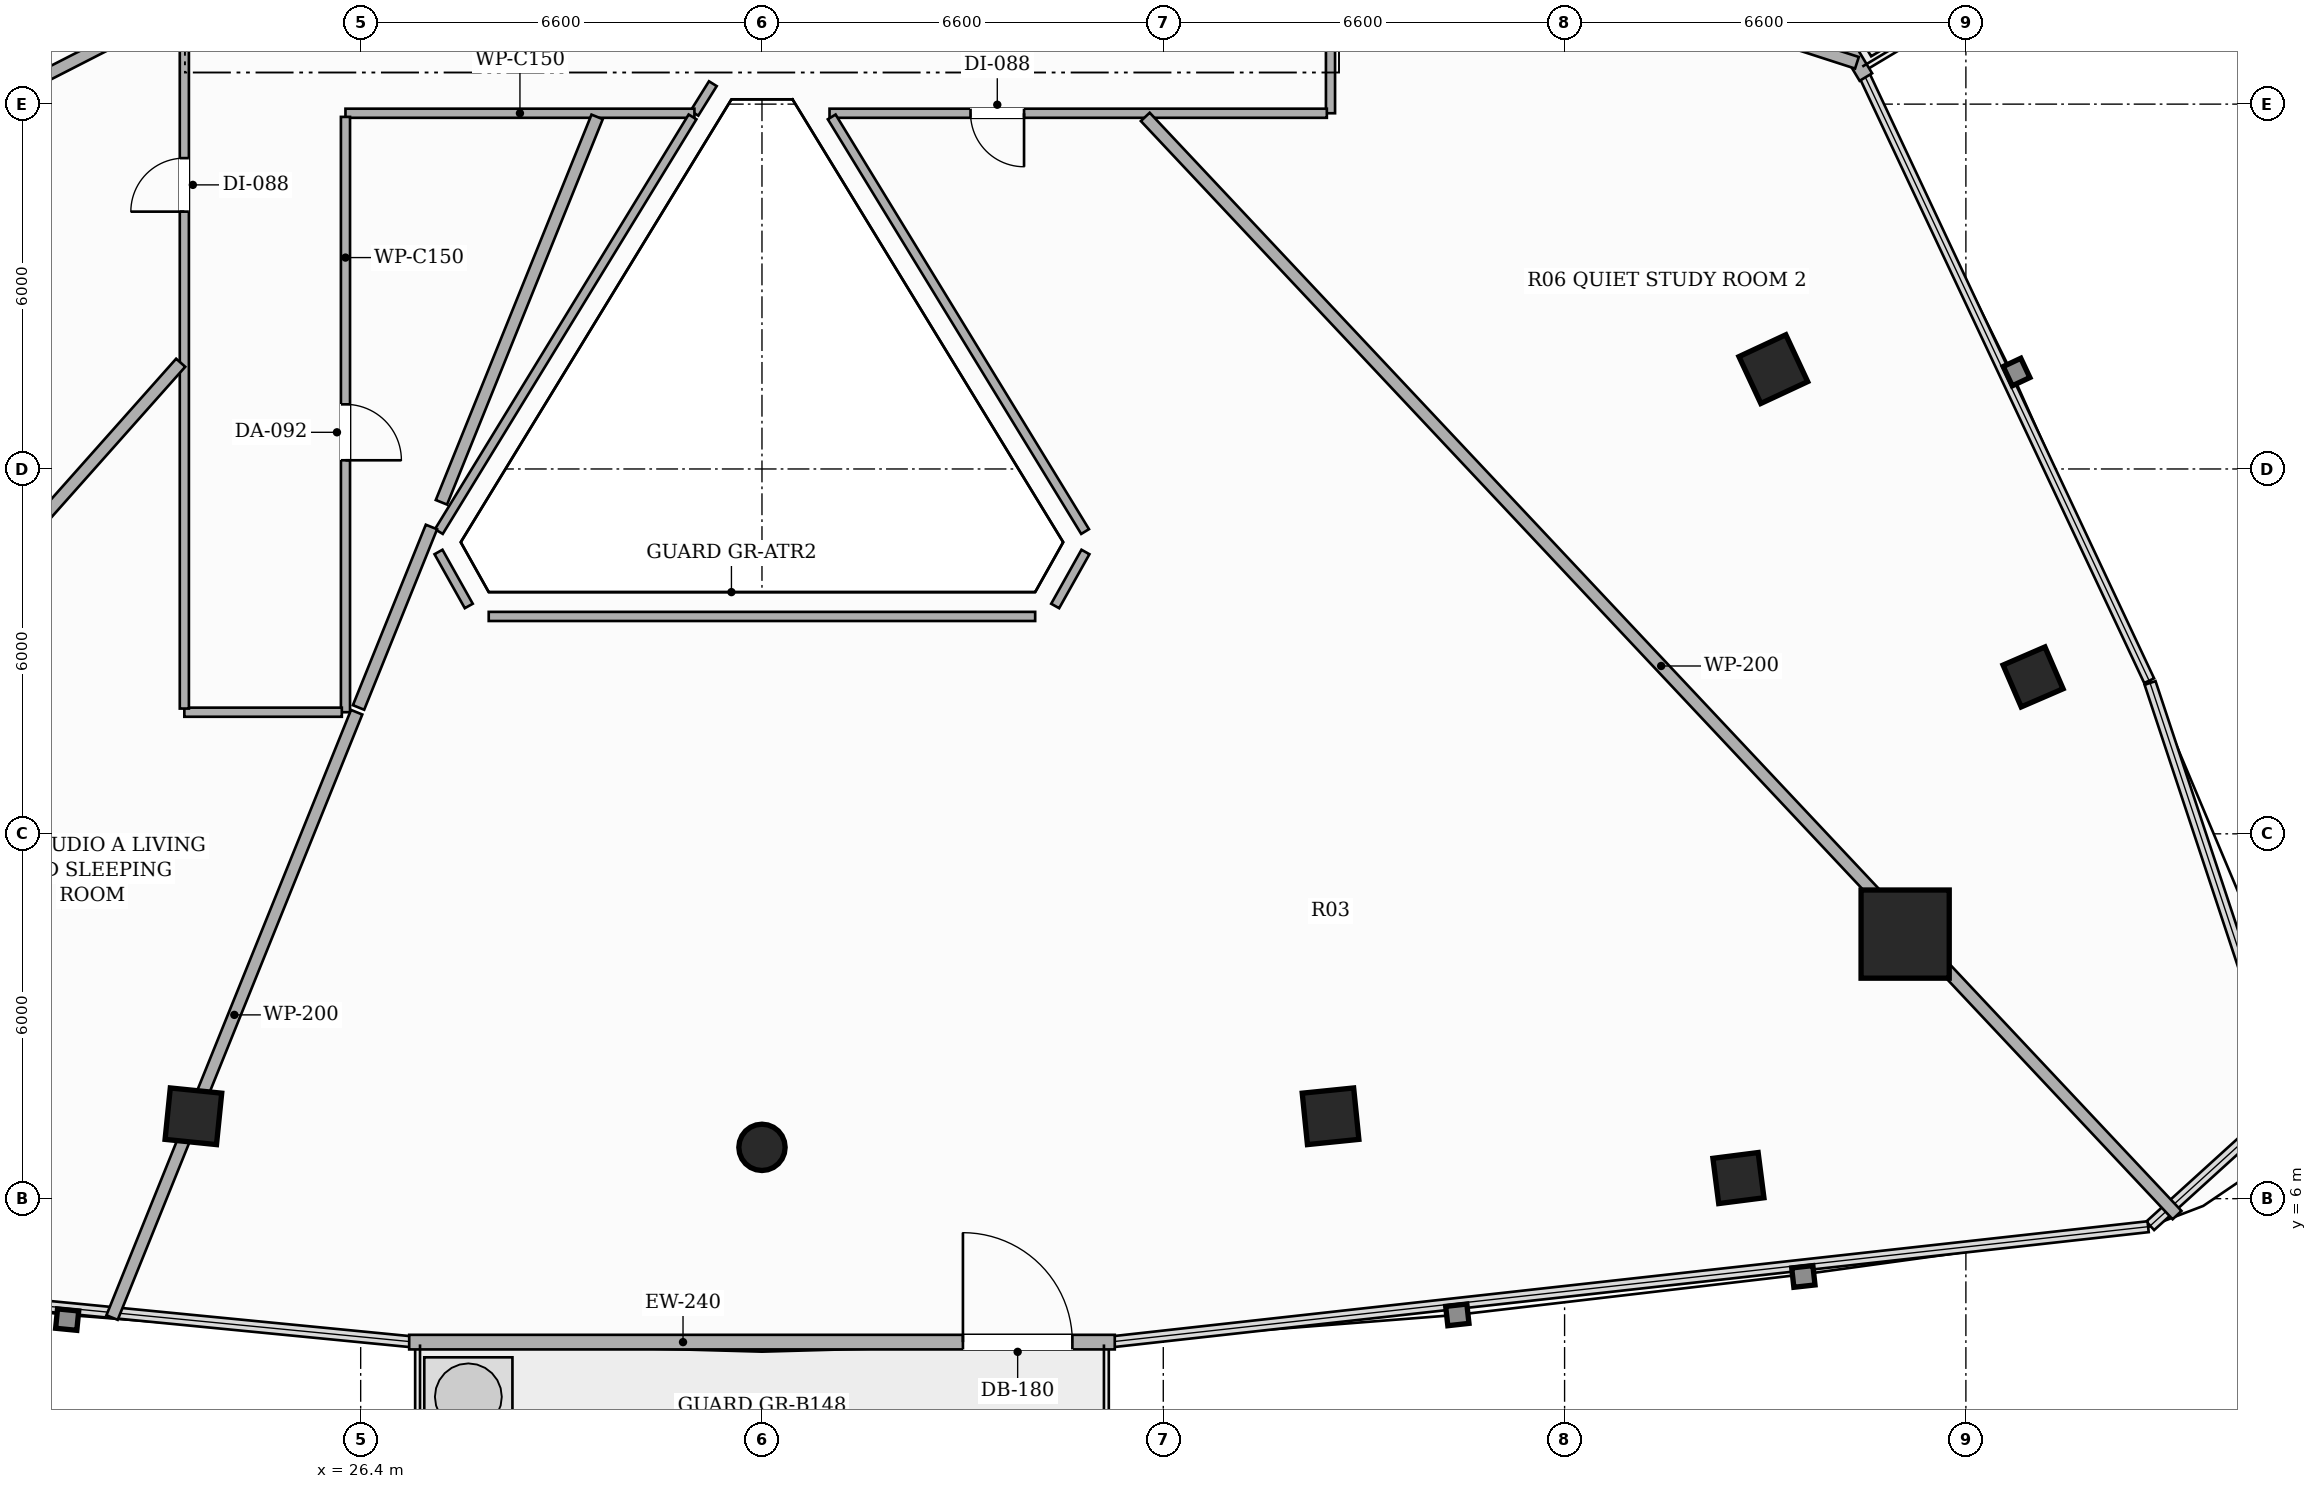
"""IFC4 building model, lengths in metres.
Left out: names, types, materials, properties, quantities, classifications, styles, units other than length and angle.
Written with IfcOpenShell. Run it as: python <this file> out.ifc"""

import sys

from ifc_helpers import new_model, si_unit, direction, frame, frame_2d, origin, origin_2d, place, context, subcontext, project, spatial, rectangle, hollow_rectangle, hollow_circle, extrude, element, fill, save


model = new_model("IFC4")
c1 = context("Model", 3, precision=1e-05, world=origin(), true_north=direction((0.0, 1.0)))
c2 = subcontext(c1, "Body", "Model", "MODEL_VIEW")
j1 = project(units=[si_unit("LENGTHUNIT", "METRE"), si_unit("PLANEANGLEUNIT", "RADIAN")], contexts=[c1])
p1 = place(None, origin())
s1 = spatial("IfcSite", under=j1, at=p1, CompositionType="ELEMENT")
p2 = place(p1, origin())
s2 = spatial("IfcBuilding", under=s1, at=p2, CompositionType="ELEMENT")
p3 = place(p2, frame((0.0, 0.0, 150.65)))
s3 = spatial("IfcBuildingStorey", under=s2, at=p3, CompositionType="ELEMENT", Elevation=150.65)
p4 = place(p3, frame((51.801, 10.351, 0.0), z_axis=(0.0, 0.0, 1.0), x_axis=(1.0, 0.0, 0.0)))
e1 = element("IfcColumn", 1, at=p4, inside=s3, PredefinedType="COLUMN", context=c2, shape_type="SweptSolid", body=[
    extrude(hollow_rectangle(XDim=1.45, YDim=1.45, WallThickness=0.045, at=origin_2d()), origin(), (0.0, 0.0, 1.0), 3.3),
])
p5 = place(p3, frame((23.649, 7.355, 0.0), z_axis=(0.0, 0.0, 1.0), x_axis=(-0.994880708829, 0.101056297183, 0.0)))
e2 = element("IfcColumn", 2, at=p5, inside=s3, PredefinedType="COLUMN", context=c2, shape_type="SweptSolid", body=[
    extrude(hollow_rectangle(XDim=0.85, YDim=0.85, WallThickness=0.028, at=origin_2d()), origin(), (0.0, 0.0, 1.0), 3.3),
])
p6 = place(p3, frame((33.0, 6.844, 0.0), z_axis=(0.0, 0.0, 1.0), x_axis=(1.0, 0.0, 0.0)))
e3 = element("IfcColumn", 3, at=p6, inside=s3, PredefinedType="COLUMN", context=c2, shape_type="SweptSolid", body=[
    extrude(hollow_circle(Radius=0.381, WallThickness=0.022, at=origin_2d()), origin(), (0.0, 0.0, 1.0), 3.3),
])
for number, where, z_axis, x_axis in (
    (4, (42.351, 7.355, 0.0), (0.0, 0.0, 1.0), (0.995, 0.101, 0.0)),
    (5, (49.633, 19.642, 0.0), (0.0, 0.0, 1.0), (-0.423, 0.906, 0.0)),
):
    element("IfcColumn", number, at=place(p3, frame(where, z_axis=z_axis, x_axis=x_axis)), inside=s3, PredefinedType="COLUMN", context=c2, shape_type="SweptSolid", body=[
        extrude(hollow_rectangle(XDim=0.85, YDim=0.85, WallThickness=0.028, at=origin_2d()), origin(), (0.0, 0.0, 1.0), 3.3),
    ])
for number, where, z_axis, x_axis in (
    (6, (49.059, 6.339, 0.0), (0.0, 0.0, 1.0), (0.992, 0.127, 0.0)),
    (7, (53.905, 14.58, 0.0), (0.0, 0.0, 1.0), (-0.397, 0.918, 0.0)),
):
    element("IfcColumn", number, at=place(p3, frame(where, z_axis=z_axis, x_axis=x_axis)), inside=s3, PredefinedType="COLUMN", context=c2, shape_type="SweptSolid", body=[
        extrude(hollow_rectangle(XDim=0.75, YDim=0.75, WallThickness=0.025, at=origin_2d()), origin(), (0.0, 0.0, 1.0), 3.3),
    ])
p7 = place(p3, frame((27.198, 3.641, 0.0), z_axis=(0.0, 0.0, 1.0), x_axis=(1.0, 0.0, 0.0)))
e8 = element("IfcWall", 8, at=p7, inside=s3, PredefinedType="SOLIDWALL", context=c2, shape_type="SweptSolid", body=[
    extrude(rectangle(XDim=11.604, YDim=0.24, at=frame_2d((5.802, 0.0))), origin(), (0.0, 0.0, 1.0), 2.624),
])
p8 = place(p7, frame((9.107, 0.0, 0.0)))
e9 = element("IfcOpeningElement", 9, at=p8, cuts=e8, PredefinedType="OPENING", context=c2, shape_type="SweptSolid", body=[
    extrude(rectangle(XDim=1.8, YDim=2.2, at=frame_2d((0.9, 1.1))), frame((0.0, 0.13, 0.0), z_axis=(0.0, -1.0, 0.0), x_axis=(1.0, 0.0, 0.0)), (0.0, 0.0, 1.0), 0.26),
])
p9 = place(p3, frame((51.155, 24.445, 0.0), z_axis=(0.0, 0.0, 1.0), x_axis=(-0.514335781973, 0.857588889493, 0.0)))
e10 = element("IfcWall", 10, at=p9, inside=s3, PredefinedType="SOLIDWALL", context=c2, shape_type="SweptSolid", body=[
    extrude(rectangle(XDim=11.222, YDim=0.24, at=frame_2d((5.611, 0.0))), origin(), (0.0, 0.0, 1.0), 2.624),
])
p10 = place(p9, frame((8.725, 0.0, 0.0)))
e11 = element("IfcOpeningElement", 11, at=p10, cuts=e10, PredefinedType="OPENING", context=c2, shape_type="SweptSolid", body=[
    extrude(rectangle(XDim=1.8, YDim=2.2, at=frame_2d((0.9, 1.1))), frame((0.0, 0.13, 0.0), z_axis=(0.0, -1.0, 0.0), x_axis=(1.0, 0.0, 0.0)), (0.0, 0.0, 1.0), 0.26),
])
p11 = place(p3, frame((32.192, 24.336, 0.0), z_axis=(0.0, 0.0, 1.0), x_axis=(-0.529155471054, -0.848524889119, 0.0)))
e12 = element("IfcWall", 12, at=p11, inside=s3, PredefinedType="PARTITIONING", context=c2, shape_type="SweptSolid", body=[
    extrude(rectangle(XDim=0.573, YDim=0.15, at=frame_2d((0.286, 0.0))), origin(), (0.0, 0.0, 1.0), 3.06),
])
p12 = place(p3, frame((31.889, 23.85, 0.0), z_axis=(0.0, 0.0, 1.0), x_axis=(-1.0, 0.0, 0.0)))
e13 = element("IfcWall", 13, at=p12, inside=s3, PredefinedType="PARTITIONING", context=c2, shape_type="SweptSolid", body=[
    extrude(rectangle(XDim=5.739, YDim=0.15, at=frame_2d((2.87, 0.0))), origin(), (0.0, 0.0, 1.0), 2.721),
])
p13 = place(p3, frame((26.15, 23.79, 0.0), z_axis=(0.0, 0.0, 1.0), x_axis=(0.0, -1.0, 0.0)))
e14 = element("IfcWall", 14, at=p13, inside=s3, PredefinedType="PARTITIONING", context=c2, shape_type="SweptSolid", body=[
    extrude(rectangle(XDim=9.79, YDim=0.15, at=frame_2d((4.895, 0.0))), origin(), (0.0, 0.0, 1.0), 2.721),
])
p14 = place(p13, frame((4.727, 0.0, 0.0)))
e15 = element("IfcOpeningElement", 15, at=p14, cuts=e14, PredefinedType="OPENING", context=c2, shape_type="SweptSolid", body=[
    extrude(rectangle(XDim=0.92, YDim=2.15, at=frame_2d((0.46, 1.075))), frame((0.0, 0.085, 0.0), z_axis=(0.0, -1.0, 0.0), x_axis=(1.0, 0.0, 0.0)), (0.0, 0.0, 1.0), 0.17),
])
p15 = place(p3, frame((26.09, 14.0, 0.0), z_axis=(0.0, 0.0, 1.0), x_axis=(-1.0, 0.0, 0.0)))
e16 = element("IfcWall", 16, at=p15, inside=s3, PredefinedType="PARTITIONING", context=c2, shape_type="SweptSolid", body=[
    extrude(rectangle(XDim=2.59, YDim=0.15, at=frame_2d((1.295, 0.0))), origin(), (0.0, 0.0, 1.0), 2.721),
])
p16 = place(p3, frame((23.5, 14.06, 0.0), z_axis=(0.0, 0.0, 1.0), x_axis=(0.0, 1.0, 0.0)))
e17 = element("IfcWall", 17, at=p16, inside=s3, PredefinedType="PARTITIONING", context=c2, shape_type="SweptSolid", body=[
    extrude(rectangle(XDim=22.84, YDim=0.15, at=frame_2d((11.42, 0.0))), origin(), (0.0, 0.0, 1.0), 2.413),
])
p17 = place(p16, frame((8.172, 0.0, 0.0)))
e18 = element("IfcOpeningElement", 18, at=p17, cuts=e17, PredefinedType="OPENING", context=c2, shape_type="SweptSolid", body=[
    extrude(rectangle(XDim=0.88, YDim=2.1, at=frame_2d((0.44, 1.05))), frame((0.0, 0.085, 0.0), z_axis=(0.0, -1.0, 0.0), x_axis=(1.0, 0.0, 0.0)), (0.0, 0.0, 1.0), 0.17),
])
p18 = place(p16, frame((20.969, 0.0, 0.0)))
e19 = element("IfcOpeningElement", 19, at=p18, cuts=e17, PredefinedType="OPENING", context=c2, shape_type="SweptSolid", body=[
    extrude(rectangle(XDim=0.88, YDim=2.1, at=frame_2d((0.44, 1.05))), frame((0.0, 0.085, 0.0), z_axis=(0.0, -1.0, 0.0), x_axis=(1.0, 0.0, 0.0)), (0.0, 0.0, 1.0), 0.17),
])
p19 = place(p16, frame((15.484, 0.0, 0.0)))
e20 = element("IfcOpeningElement", 20, at=p19, cuts=e17, PredefinedType="OPENING", context=c2, shape_type="SweptSolid", body=[
    extrude(rectangle(XDim=0.88, YDim=2.1, at=frame_2d((0.44, 1.05))), frame((0.0, 0.085, 0.0), z_axis=(0.0, -1.0, 0.0), x_axis=(1.0, 0.0, 0.0)), (0.0, 0.0, 1.0), 0.17),
])
p20 = place(p3, frame((42.35, 28.34, 0.0), z_axis=(0.0, 0.0, 1.0), x_axis=(0.0, -1.0, 0.0)))
e21 = element("IfcWall", 21, at=p20, inside=s3, PredefinedType="PARTITIONING", context=c2, shape_type="SweptSolid", body=[
    extrude(rectangle(XDim=4.49, YDim=0.15, at=frame_2d((2.245, 0.0))), origin(), (0.0, 0.0, 1.0), 2.721),
])
p21 = place(p20, frame((2.086, 0.0, 0.0)))
e22 = element("IfcOpeningElement", 22, at=p21, cuts=e21, PredefinedType="OPENING", context=c2, shape_type="SweptSolid", body=[
    extrude(rectangle(XDim=0.88, YDim=2.1, at=frame_2d((0.44, 1.05))), frame((0.0, 0.085, 0.0), z_axis=(0.0, -1.0, 0.0), x_axis=(1.0, 0.0, 0.0)), (0.0, 0.0, 1.0), 0.17),
])
p22 = place(p3, frame((42.29, 23.85, 0.0), z_axis=(0.0, 0.0, 1.0), x_axis=(-1.0, 0.0, 0.0)))
e23 = element("IfcWall", 23, at=p22, inside=s3, PredefinedType="PARTITIONING", context=c2, shape_type="SweptSolid", body=[
    extrude(rectangle(XDim=8.179, YDim=0.15, at=frame_2d((4.089, 0.0))), origin(), (0.0, 0.0, 1.0), 2.492),
])
p23 = place(p22, frame((4.98, 0.0, 0.0)))
e24 = element("IfcOpeningElement", 24, at=p23, cuts=e23, PredefinedType="OPENING", context=c2, shape_type="SweptSolid", body=[
    extrude(rectangle(XDim=0.88, YDim=2.1, at=frame_2d((0.44, 1.05))), frame((0.0, 0.085, 0.0), z_axis=(0.0, -1.0, 0.0), x_axis=(1.0, 0.0, 0.0)), (0.0, 0.0, 1.0), 0.17),
])
p24 = place(p3, frame((34.147, 23.79, 0.0), z_axis=(0.0, 0.0, 1.0), x_axis=(0.521429001816, -0.853294671298, 0.0)))
e25 = element("IfcWall", 25, at=p24, inside=s3, PredefinedType="PARTITIONING", context=c2, shape_type="SweptSolid", body=[
    extrude(rectangle(XDim=7.991, YDim=0.15, at=frame_2d((3.996, 0.0))), origin(), (0.0, 0.0, 1.0), 2.721),
])
p25 = place(p3, frame((38.32, 16.635, 0.0), z_axis=(0.0, 0.0, 1.0), x_axis=(-0.489202035948, -0.872170492521, 0.0)))
e26 = element("IfcWall", 26, at=p25, inside=s3, PredefinedType="PARTITIONING", context=c2, shape_type="SweptSolid", body=[
    extrude(rectangle(XDim=1.018, YDim=0.15, at=frame_2d((0.509, 0.0))), origin(), (0.0, 0.0, 1.0), 3.06),
])
p26 = place(p3, frame((37.493, 15.575, 0.0), z_axis=(0.0, 0.0, 1.0), x_axis=(-1.0, 0.0, 0.0)))
e27 = element("IfcWall", 27, at=p26, inside=s3, PredefinedType="PARTITIONING", context=c2, shape_type="SweptSolid", body=[
    extrude(rectangle(XDim=8.987, YDim=0.15, at=frame_2d((4.493, 0.0))), origin(), (0.0, 0.0, 1.0), 2.721),
])
p27 = place(p3, frame((28.178, 15.747, 0.0), z_axis=(0.0, 0.0, 1.0), x_axis=(-0.489202035948, 0.872170492521, 0.0)))
e28 = element("IfcWall", 28, at=p27, inside=s3, PredefinedType="PARTITIONING", context=c2, shape_type="SweptSolid", body=[
    extrude(rectangle(XDim=1.018, YDim=0.15, at=frame_2d((0.509, 0.0))), origin(), (0.0, 0.0, 1.0), 3.06),
])
p28 = place(p3, frame((27.686, 16.971, 0.0), z_axis=(0.0, 0.0, 1.0), x_axis=(0.521873666917, 0.853022787374, 0.0)))
e29 = element("IfcWall", 29, at=p28, inside=s3, PredefinedType="PARTITIONING", context=c2, shape_type="SweptSolid", body=[
    extrude(rectangle(XDim=7.994, YDim=0.15, at=frame_2d((3.997, 0.0))), origin(), (0.0, 0.0, 1.0), 2.721),
])
p29 = place(p3, frame((39.304, 23.79, 0.0), z_axis=(0.0, 0.0, 1.0), x_axis=(0.684750154022, -0.72877789934, 0.0)))
e30 = element("IfcWall", 30, at=p29, inside=s3, PredefinedType="PARTITIONING", context=c2, shape_type="SweptSolid", body=[
    extrude(rectangle(XDim=24.781, YDim=0.2, at=frame_2d((12.391, 0.0))), origin(), (0.0, 0.0, 1.0), 2.413),
])
p30 = place(p3, frame((22.311, 4.045, 0.0), z_axis=(0.0, 0.0, 1.0), x_axis=(0.374673572515, 0.92715679044, 0.0)))
e31 = element("IfcWall", 31, at=p30, inside=s3, PredefinedType="PARTITIONING", context=c2, shape_type="SweptSolid", body=[
    extrude(rectangle(XDim=10.737, YDim=0.2, at=frame_2d((5.369, 0.0))), origin(), (0.0, 0.0, 1.0), 2.413),
])
p31 = place(p3, frame((26.365, 14.078, 0.0), z_axis=(0.0, 0.0, 1.0), x_axis=(0.374557626207, 0.927203637099, 0.0)))
e32 = element("IfcWall", 32, at=p31, inside=s3, PredefinedType="PARTITIONING", context=c2, shape_type="SweptSolid", body=[
    extrude(rectangle(XDim=3.201, YDim=0.2, at=frame_2d((1.601, 0.0))), origin(), (0.0, 0.0, 1.0), 3.06),
])
p32 = place(p3, frame((27.728, 17.452, 0.0), z_axis=(0.0, 0.0, 1.0), x_axis=(0.374639602714, 0.927170517261, 0.0)))
e33 = element("IfcWall", 33, at=p32, inside=s3, PredefinedType="PARTITIONING", context=c2, shape_type="SweptSolid", body=[
    extrude(rectangle(XDim=6.836, YDim=0.2, at=frame_2d((3.418, 0.0))), origin(), (0.0, 0.0, 1.0), 2.721),
])
p33 = place(p3, frame((42.41, 27.459, 0.0), z_axis=(0.0, 0.0, 1.0), x_axis=(0.951531988225, -0.307549793343, 0.0)))
e34 = element("IfcWall", 34, at=p33, inside=s3, PredefinedType="PARTITIONING", context=c2, shape_type="SweptSolid", body=[
    extrude(rectangle(XDim=9.036, YDim=0.2, at=frame_2d((4.518, 0.0))), origin(), (0.0, 0.0, 1.0), 2.413),
])
p34 = place(p3, frame((23.44, 19.747, 0.0), z_axis=(0.0, 0.0, 1.0), x_axis=(-0.664444771995, -0.747337370248, 0.0)))
e35 = element("IfcWall", 35, at=p34, inside=s3, PredefinedType="PARTITIONING", context=c2, shape_type="SweptSolid", body=[
    extrude(rectangle(XDim=19.097, YDim=0.2, at=frame_2d((9.549, 0.0))), origin(), (0.0, 0.0, 1.0), 2.413),
])
p35 = place(p3, frame((12.728, 20.13, 0.0), z_axis=(0.0, 0.0, 1.0), x_axis=(0.890257920911, 0.455456731486, 0.0)))
e36 = element("IfcWall", 36, at=p35, inside=s3, PredefinedType="PARTITIONING", context=c2, shape_type="SweptSolid", body=[
    extrude(rectangle(XDim=12.032, YDim=0.2, at=frame_2d((6.016, 0.0))), origin(), (0.0, 0.0, 1.0), 2.413),
])
p36 = place(p8, origin())
e37 = element("IfcDoor", 37, at=p36, inside=s3, OperationType="SINGLE_SWING_LEFT", PredefinedType="DOOR", context=c2, shape_type="SweptSolid", body=[
    extrude(rectangle(XDim=1.8, YDim=2.2, at=frame_2d((0.9, 1.1))), frame((0.0, 0.025, 0.0), z_axis=(0.0, -1.0, 0.0), x_axis=(1.0, 0.0, 0.0)), (0.0, 0.0, 1.0), 0.05),
])
fill(e9, e37)
p37 = place(p23, origin())
e38 = element("IfcDoor", 38, at=p37, inside=s3, OperationType="SINGLE_SWING_LEFT", PredefinedType="DOOR", context=c2, shape_type="SweptSolid", body=[
    extrude(rectangle(XDim=0.88, YDim=2.1, at=frame_2d((0.44, 1.05))), frame((0.0, 0.025, 0.0), z_axis=(0.0, -1.0, 0.0), x_axis=(1.0, 0.0, 0.0)), (0.0, 0.0, 1.0), 0.05),
])
fill(e24, e38)
p38 = place(p17, origin())
e39 = element("IfcDoor", 39, at=p38, inside=s3, OperationType="SINGLE_SWING_LEFT", PredefinedType="DOOR", context=c2, shape_type="SweptSolid", body=[
    extrude(rectangle(XDim=0.88, YDim=2.1, at=frame_2d((0.44, 1.05))), frame((0.0, 0.025, 0.0), z_axis=(0.0, -1.0, 0.0), x_axis=(1.0, 0.0, 0.0)), (0.0, 0.0, 1.0), 0.05),
])
fill(e18, e39)
p39 = place(p14, origin())
e40 = element("IfcDoor", 40, at=p39, inside=s3, OperationType="SINGLE_SWING_RIGHT", PredefinedType="DOOR", context=c2, shape_type="SweptSolid", body=[
    extrude(rectangle(XDim=0.92, YDim=2.15, at=frame_2d((0.46, 1.075))), frame((0.0, 0.025, 0.0), z_axis=(0.0, -1.0, 0.0), x_axis=(1.0, 0.0, 0.0)), (0.0, 0.0, 1.0), 0.05),
])
fill(e15, e40)
save(model, sys.argv[1])
